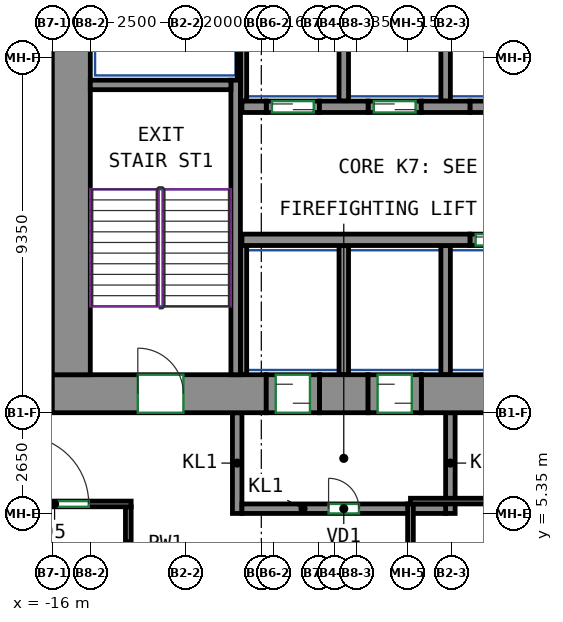
"""IFC4 building model, lengths in metres.
Left out: names, types, materials, properties, quantities, classifications, styles, units other than length and angle.
Written with IfcOpenShell. Run it as: python <this file> out.ifc"""

import sys

from ifc_helpers import new_model, si_unit, direction, frame, frame_2d, origin, place, context, subcontext, project, spatial, rectangle, extrude, source, transform, mapped, element, fill, save


model = new_model("IFC4")
c1 = context("Model", 3, precision=1e-05, world=origin(), true_north=direction((0.0, 1.0)))
c2 = subcontext(c1, "Body", "Model", "MODEL_VIEW")
j1 = project(units=[si_unit("LENGTHUNIT", "METRE"), si_unit("PLANEANGLEUNIT", "RADIAN")], contexts=[c1])
p1 = place(None, origin())
s1 = spatial("IfcSite", under=j1, at=p1, CompositionType="ELEMENT")
p2 = place(p1, origin())
s2 = spatial("IfcBuilding", under=s1, at=p2, CompositionType="ELEMENT")
p3 = place(p2, frame((0.0, 0.0, 31.0)))
s3 = spatial("IfcBuildingStorey", under=s2, at=p3, CompositionType="ELEMENT", Elevation=31.0)
m1 = source(origin(), c2, "Body", "SweptSolid", [
    extrude(rectangle(XDim=5.63, YDim=1.0, at=frame_2d((2.815, 0.0))), origin(), (0.0, 0.0, 1.0), 3.72),
])
p4 = place(p3, frame((-16.0, 8.5, 0.0), z_axis=(0.0, 0.0, 1.0), x_axis=(1.0, 0.0, 0.0)))
e1 = element("IfcWall", 1, at=p4, inside=s3, PredefinedType="SHEAR", context=c2, shape_type="MappedRepresentation", body=[
    mapped(m1, transform((0.0, 0.0, 0.0))),
])
p5 = place(p4, frame((2.25, 0.0, 0.0)))
e2 = element("IfcOpeningElement", 2, at=p5, cuts=e1, PredefinedType="OPENING", context=c2, shape_type="SweptSolid", body=[
    extrude(rectangle(XDim=1.2, YDim=2.1, at=frame_2d((0.6, 1.05))), frame((0.0, 0.51, 0.0), z_axis=(0.0, -1.0, 0.0), x_axis=(1.0, 0.0, 0.0)), (0.0, 0.0, 1.0), 1.02),
])
m2 = source(origin(), c2, "Body", "SweptSolid", [
    extrude(rectangle(XDim=1.28, YDim=1.0, at=frame_2d((0.64, 0.0))), origin(), (0.0, 0.0, 1.0), 3.72),
])
p6 = place(p3, frame((-8.97, 8.5, 0.0), z_axis=(0.0, 0.0, 1.0), x_axis=(1.0, 0.0, 0.0)))
e3 = element("IfcWall", 3, at=p6, inside=s3, PredefinedType="SHEAR", context=c2, shape_type="MappedRepresentation", body=[
    mapped(m2, transform((0.0, 0.0, 0.0))),
])
m3 = source(origin(), c2, "Body", "SweptSolid", [
    extrude(rectangle(XDim=14.18, YDim=1.0, at=frame_2d((7.09, 0.0))), origin(), (0.0, 0.0, 1.0), 3.72),
])
p7 = place(p3, frame((-6.29, 8.5, 0.0), z_axis=(0.0, 0.0, 1.0), x_axis=(1.0, 0.0, 0.0)))
e4 = element("IfcWall", 4, at=p7, inside=s3, PredefinedType="SHEAR", context=c2, shape_type="MappedRepresentation", body=[
    mapped(m3, transform((0.0, 0.0, 0.0))),
])
m4 = source(origin(), c2, "Body", "SweptSolid", [
    extrude(rectangle(XDim=12.0, YDim=1.0, at=frame_2d((6.0, 0.0))), origin(), (0.0, 0.0, 1.0), 3.72),
])
p8 = place(p3, frame((-15.5, 9.0, 0.0), z_axis=(0.0, 0.0, 1.0), x_axis=(0.0, 1.0, 0.0)))
e5 = element("IfcWall", 5, at=p8, inside=s3, PredefinedType="SHEAR", context=c2, shape_type="MappedRepresentation", body=[
    mapped(m4, transform((0.0, 0.0, 0.0))),
])
m5 = source(origin(), c2, "Body", "SweptSolid", [
    extrude(rectangle(XDim=7.75, YDim=0.25, at=frame_2d((3.875, 0.0))), origin(), (0.0, 0.0, 1.0), 3.72),
])
p9 = place(p3, frame((-11.175, 9.0, 0.0), z_axis=(0.0, 0.0, 1.0), x_axis=(0.0, 1.0, 0.0)))
e6 = element("IfcWall", 6, at=p9, inside=s3, PredefinedType="SHEAR", context=c2, shape_type="MappedRepresentation", body=[
    mapped(m5, transform((0.0, 0.0, 0.0))),
])
m6 = source(origin(), c2, "Body", "SweptSolid", [
    extrude(rectangle(XDim=3.7, YDim=0.25, at=frame_2d((1.85, 0.0))), origin(), (0.0, 0.0, 1.0), 3.72),
])
p10 = place(p3, frame((-15.0, 16.625, 0.0), z_axis=(0.0, 0.0, 1.0), x_axis=(1.0, 0.0, 0.0)))
e7 = element("IfcWall", 7, at=p10, inside=s3, PredefinedType="SHEAR", context=c2, shape_type="MappedRepresentation", body=[
    mapped(m6, transform((0.0, 0.0, 0.0))),
])
m7 = source(origin(), c2, "Body", "SweptSolid", [
    extrude(rectangle(XDim=6.0, YDim=0.3, at=frame_2d((3.0, 0.0))), origin(), (0.0, 0.0, 1.0), 3.72),
])
p11 = place(p3, frame((-11.01, 12.55, 0.0), z_axis=(0.0, 0.0, 1.0), x_axis=(1.0, 0.0, 0.0)))
e8 = element("IfcWall", 8, at=p11, inside=s3, PredefinedType="SHEAR", context=c2, shape_type="MappedRepresentation", body=[
    mapped(m7, transform((0.0, 0.0, 0.0))),
])
m8 = source(origin(), c2, "Body", "SweptSolid", [
    extrude(rectangle(XDim=0.64, YDim=0.3, at=frame_2d((0.32, 0.0))), origin(), (0.0, 0.0, 1.0), 3.72),
])
p12 = place(p3, frame((-11.01, 16.05, 0.0), z_axis=(0.0, 0.0, 1.0), x_axis=(1.0, 0.0, 0.0)))
e9 = element("IfcWall", 9, at=p12, inside=s3, PredefinedType="SHEAR", context=c2, shape_type="MappedRepresentation", body=[
    mapped(m8, transform((0.0, 0.0, 0.0))),
])
m9 = source(origin(), c2, "Body", "SweptSolid", [
    extrude(rectangle(XDim=1.28, YDim=0.3, at=frame_2d((0.64, 0.0))), origin(), (0.0, 0.0, 1.0), 3.72),
])
for number, where, z_axis, x_axis in (
    (10, (-8.97, 16.05, 0.0), (0.0, 0.0, 1.0), (1.0, 0.0, 0.0)),
    (11, (-6.29, 16.05, 0.0), (0.0, 0.0, 1.0), (1.0, 0.0, 0.0)),
):
    element("IfcWall", number, at=place(p3, frame(where, z_axis=z_axis, x_axis=x_axis)), inside=s3, PredefinedType="SHEAR", context=c2, shape_type="MappedRepresentation", body=[
        mapped(m9, transform((0.0, 0.0, 0.0))),
    ])
m10 = source(origin(), c2, "Body", "SweptSolid", [
    extrude(rectangle(XDim=1.4, YDim=0.3, at=frame_2d((0.7, 0.0))), origin(), (0.0, 0.0, 1.0), 3.72),
])
p13 = place(p3, frame((-5.01, 12.55, 0.0), z_axis=(0.0, 0.0, 1.0), x_axis=(1.0, 0.0, 0.0)))
e12 = element("IfcWall", 12, at=p13, inside=s3, PredefinedType="PARTITIONING", context=c2, shape_type="MappedRepresentation", body=[
    mapped(m10, transform((0.0, 0.0, 0.0))),
])
p14 = place(p13, frame((0.15, 0.0, 0.0)))
e13 = element("IfcOpeningElement", 13, at=p14, cuts=e12, PredefinedType="OPENING", context=c2, shape_type="SweptSolid", body=[
    extrude(rectangle(XDim=1.1, YDim=2.1, at=frame_2d((0.55, 1.05))), frame((0.0, 0.16, 0.0), z_axis=(0.0, -1.0, 0.0), x_axis=(1.0, 0.0, 0.0)), (0.0, 0.0, 1.0), 0.32),
])
m11 = source(origin(), c2, "Body", "SweptSolid", [
    extrude(rectangle(XDim=1.4, YDim=0.3, at=frame_2d((0.7, 0.0))), origin(), (0.0, 0.0, 1.0), 3.72),
])
p15 = place(p3, frame((-10.37, 16.05, 0.0), z_axis=(0.0, 0.0, 1.0), x_axis=(1.0, 0.0, 0.0)))
e14 = element("IfcWall", 14, at=p15, inside=s3, PredefinedType="PARTITIONING", context=c2, shape_type="MappedRepresentation", body=[
    mapped(m11, transform((0.0, 0.0, 0.0))),
])
p16 = place(p15, frame((0.15, 0.0, 0.0)))
e15 = element("IfcOpeningElement", 15, at=p16, cuts=e14, PredefinedType="OPENING", context=c2, shape_type="SweptSolid", body=[
    extrude(rectangle(XDim=1.1, YDim=2.1, at=frame_2d((0.55, 1.05))), frame((0.0, 0.16, 0.0), z_axis=(0.0, -1.0, 0.0), x_axis=(1.0, 0.0, 0.0)), (0.0, 0.0, 1.0), 0.32),
])
p17 = place(p3, frame((-7.69, 16.05, 0.0), z_axis=(0.0, 0.0, 1.0), x_axis=(1.0, 0.0, 0.0)))
e16 = element("IfcWall", 16, at=p17, inside=s3, PredefinedType="PARTITIONING", context=c2, shape_type="MappedRepresentation", body=[
    mapped(m10, transform((0.0, 0.0, 0.0))),
])
p18 = place(p17, frame((0.15, 0.0, 0.0)))
e17 = element("IfcOpeningElement", 17, at=p18, cuts=e16, PredefinedType="OPENING", context=c2, shape_type="SweptSolid", body=[
    extrude(rectangle(XDim=1.1, YDim=2.1, at=frame_2d((0.55, 1.05))), frame((0.0, 0.16, 0.0), z_axis=(0.0, -1.0, 0.0), x_axis=(1.0, 0.0, 0.0)), (0.0, 0.0, 1.0), 0.32),
])
p19 = place(p3, frame((-5.01, 16.05, 0.0), z_axis=(0.0, 0.0, 1.0), x_axis=(1.0, 0.0, 0.0)))
e18 = element("IfcWall", 18, at=p19, inside=s3, PredefinedType="PARTITIONING", context=c2, shape_type="MappedRepresentation", body=[
    mapped(m10, transform((0.0, 0.0, 0.0))),
])
m12 = source(origin(), c2, "Body", "SweptSolid", [
    extrude(rectangle(XDim=2.65, YDim=0.25, at=frame_2d((1.325, 0.0))), origin(), (0.0, 0.0, 1.0), 3.72),
])
for number, where, z_axis, x_axis in (
    (19, (-11.135, 5.35, 0.0), (0.0, 0.0, 1.0), (0.0, 1.0, 0.0)),
    (20, (-5.525, 5.35, 0.0), (0.0, 0.0, 1.0), (0.0, 1.0, 0.0)),
):
    element("IfcWall", number, at=place(p3, frame(where, z_axis=z_axis, x_axis=x_axis)), inside=s3, PredefinedType="PARTITIONING", context=c2, shape_type="MappedRepresentation", body=[
        mapped(m12, transform((0.0, 0.0, 0.0))),
    ])
m13 = source(origin(), c2, "Body", "SweptSolid", [
    extrude(rectangle(XDim=5.36, YDim=0.25, at=frame_2d((2.68, 0.0))), origin(), (0.0, 0.0, 1.0), 3.72),
])
p20 = place(p3, frame((-11.01, 5.475, 0.0), z_axis=(0.0, 0.0, 1.0), x_axis=(1.0, 0.0, 0.0)))
e21 = element("IfcWall", 21, at=p20, inside=s3, PredefinedType="PARTITIONING", context=c2, shape_type="MappedRepresentation", body=[
    mapped(m13, transform((0.0, 0.0, 0.0))),
])
p21 = place(p20, frame((2.28, 0.0, 0.0)))
e22 = element("IfcOpeningElement", 22, at=p21, cuts=e21, PredefinedType="OPENING", context=c2, shape_type="SweptSolid", body=[
    extrude(rectangle(XDim=0.8, YDim=2.0, at=frame_2d((0.4, 1.0))), frame((0.0, 0.135, 0.0), z_axis=(0.0, -1.0, 0.0), x_axis=(1.0, 0.0, 0.0)), (0.0, 0.0, 1.0), 0.27),
])
m14 = source(origin(), c2, "Body", "SweptSolid", [
    extrude(rectangle(XDim=3.275, YDim=0.165, at=frame_2d((1.638, 0.0))), origin(), (0.0, 0.0, 1.0), 3.72),
])
p22 = place(p3, frame((-10.968, 16.2, 0.0), z_axis=(0.0, 0.0, 1.0), x_axis=(0.0, 1.0, 0.0)))
e23 = element("IfcWall", 23, at=p22, inside=s3, PredefinedType="PARTITIONING", context=c2, shape_type="MappedRepresentation", body=[
    mapped(m14, transform((0.0, 0.0, 0.0))),
])
m15 = source(origin(), c2, "Body", "SweptSolid", [
    extrude(rectangle(XDim=2.725, YDim=0.085, at=frame_2d((1.363, 0.0))), origin(), (0.0, 0.0, 1.0), 3.72),
])
p23 = place(p3, frame((-11.093, 16.75, 0.0), z_axis=(0.0, 0.0, 1.0), x_axis=(0.0, 1.0, 0.0)))
e24 = element("IfcWall", 24, at=p23, inside=s3, PredefinedType="PARTITIONING", context=c2, shape_type="MappedRepresentation", body=[
    mapped(m15, transform((0.0, 0.0, 0.0))),
])
m16 = source(origin(), c2, "Body", "SweptSolid", [
    extrude(rectangle(XDim=3.275, YDim=0.25, at=frame_2d((1.638, 0.0))), origin(), (0.0, 0.0, 1.0), 3.72),
])
for number, where, z_axis, x_axis in (
    (25, (-5.65, 16.2, 0.0), (0.0, 0.0, 1.0), (0.0, 1.0, 0.0)),
    (26, (-8.33, 16.2, 0.0), (0.0, 0.0, 1.0), (0.0, 1.0, 0.0)),
):
    element("IfcWall", number, at=place(p3, frame(where, z_axis=z_axis, x_axis=x_axis)), inside=s3, PredefinedType="PARTITIONING", context=c2, shape_type="MappedRepresentation", body=[
        mapped(m16, transform((0.0, 0.0, 0.0))),
    ])
m17 = source(origin(), c2, "Body", "SweptSolid", [
    extrude(rectangle(XDim=3.4, YDim=0.165, at=frame_2d((1.7, 0.0))), origin(), (0.0, 0.0, 1.0), 3.72),
])
p24 = place(p3, frame((-10.968, 9.0, 0.0), z_axis=(0.0, 0.0, 1.0), x_axis=(0.0, 1.0, 0.0)))
e27 = element("IfcWall", 27, at=p24, inside=s3, PredefinedType="PARTITIONING", context=c2, shape_type="MappedRepresentation", body=[
    mapped(m17, transform((0.0, 0.0, 0.0))),
])
m18 = source(origin(), c2, "Body", "SweptSolid", [
    extrude(rectangle(XDim=3.4, YDim=0.25, at=frame_2d((1.7, 0.0))), origin(), (0.0, 0.0, 1.0), 3.72),
])
for number, where, z_axis, x_axis in (
    (28, (-5.65, 9.0, 0.0), (0.0, 0.0, 1.0), (0.0, 1.0, 0.0)),
    (29, (-8.33, 9.0, 0.0), (0.0, 0.0, 1.0), (0.0, 1.0, 0.0)),
):
    element("IfcWall", number, at=place(p3, frame(where, z_axis=z_axis, x_axis=x_axis)), inside=s3, PredefinedType="PARTITIONING", context=c2, shape_type="MappedRepresentation", body=[
        mapped(m18, transform((0.0, 0.0, 0.0))),
    ])
m19 = source(origin(), c2, "Body", "SweptSolid", [
    extrude(rectangle(XDim=1.4, YDim=1.0, at=frame_2d((0.7, 0.0))), origin(), (0.0, 0.0, 1.0), 2.7),
])
p25 = place(p3, frame((-10.37, 8.5, 0.0), z_axis=(0.0, 0.0, 1.0), x_axis=(1.0, 0.0, 0.0)))
e30 = element("IfcWall", 30, at=p25, inside=s3, PredefinedType="PARTITIONING", context=c2, shape_type="MappedRepresentation", body=[
    mapped(m19, transform((0.0, 0.0, 0.0))),
])
p26 = place(p25, frame((0.25, 0.0, 0.0)))
e31 = element("IfcOpeningElement", 31, at=p26, cuts=e30, PredefinedType="OPENING", context=c2, shape_type="SweptSolid", body=[
    extrude(rectangle(XDim=0.9, YDim=2.1, at=frame_2d((0.45, 1.05))), frame((0.0, 0.51, 0.0), z_axis=(0.0, -1.0, 0.0), x_axis=(1.0, 0.0, 0.0)), (0.0, 0.0, 1.0), 1.02),
])
m20 = source(origin(), c2, "Body", "SweptSolid", [
    extrude(rectangle(XDim=1.4, YDim=1.0, at=frame_2d((0.7, 0.0))), origin(), (0.0, 0.0, 1.0), 2.7),
])
p27 = place(p3, frame((-7.69, 8.5, 0.0), z_axis=(0.0, 0.0, 1.0), x_axis=(1.0, 0.0, 0.0)))
e32 = element("IfcWall", 32, at=p27, inside=s3, PredefinedType="PARTITIONING", context=c2, shape_type="MappedRepresentation", body=[
    mapped(m20, transform((0.0, 0.0, 0.0))),
])
p28 = place(p27, frame((0.25, 0.0, 0.0)))
e33 = element("IfcOpeningElement", 33, at=p28, cuts=e32, PredefinedType="OPENING", context=c2, shape_type="SweptSolid", body=[
    extrude(rectangle(XDim=0.9, YDim=2.1, at=frame_2d((0.45, 1.05))), frame((0.0, 0.51, 0.0), z_axis=(0.0, -1.0, 0.0), x_axis=(1.0, 0.0, 0.0)), (0.0, 0.0, 1.0), 1.02),
])
p29 = place(p3, frame((-14.0, 5.525, 0.0), z_axis=(0.0, 0.0, 1.0), x_axis=(0.0, -1.0, 0.0)))
e34 = element("IfcWall", 34, at=p29, inside=s3, PredefinedType="PARTITIONING", context=c2, shape_type="SweptSolid", body=[
    extrude(rectangle(XDim=1.95, YDim=0.15, at=frame_2d((0.975, 0.0))), origin(), (0.0, 0.0, 1.0), 3.72),
])
p30 = place(p3, frame((-19.275, 5.6, 0.0), z_axis=(0.0, 0.0, 1.0), x_axis=(1.0, 0.0, 0.0)))
e35 = element("IfcWall", 35, at=p30, inside=s3, PredefinedType="PARTITIONING", context=c2, shape_type="SweptSolid", body=[
    extrude(rectangle(XDim=5.35, YDim=0.15, at=frame_2d((2.675, 0.0))), origin(), (0.0, 0.0, 1.0), 3.72),
])
p31 = place(p30, frame((2.435, 0.0, 0.0)))
e36 = element("IfcOpeningElement", 36, at=p31, cuts=e35, PredefinedType="OPENING", context=c2, shape_type="SweptSolid", body=[
    extrude(rectangle(XDim=1.8, YDim=2.1, at=frame_2d((0.9, 1.05))), frame((0.0, 0.085, 0.0), z_axis=(0.0, -1.0, 0.0), x_axis=(1.0, 0.0, 0.0)), (0.0, 0.0, 1.0), 0.17),
])
p32 = place(p3, frame((-6.575, -9.4, 0.0), z_axis=(0.0, 0.0, 1.0), x_axis=(0.0, 1.0, 0.0)))
e37 = element("IfcWall", 37, at=p32, inside=s3, PredefinedType="PARTITIONING", context=c2, shape_type="SweptSolid", body=[
    extrude(rectangle(XDim=15.0, YDim=0.15, at=frame_2d((7.5, 0.0))), origin(), (0.0, 0.0, 1.0), 3.72),
])
p33 = place(p3, frame((-6.575, 5.675, 0.0), z_axis=(0.0, 0.0, 1.0), x_axis=(1.0, 0.0, 0.0)))
e38 = element("IfcWall", 38, at=p33, inside=s3, PredefinedType="PARTITIONING", context=c2, shape_type="SweptSolid", body=[
    extrude(rectangle(XDim=15.075, YDim=0.15, at=frame_2d((7.538, 0.0))), origin(), (0.0, 0.0, 1.0), 3.72),
])
p34 = place(p21, origin())
e39 = element("IfcDoor", 39, at=p34, inside=s3, OperationType="SINGLE_SWING_LEFT", PredefinedType="DOOR", context=c2, shape_type="SweptSolid", body=[
    extrude(rectangle(XDim=0.8, YDim=2.0, at=frame_2d((0.4, 1.0))), frame((0.0, 0.025, 0.0), z_axis=(0.0, -1.0, 0.0), x_axis=(1.0, 0.0, 0.0)), (0.0, 0.0, 1.0), 0.05),
])
fill(e22, e39)
p35 = place(p26, origin())
e40 = element("IfcDoor", 40, at=p35, inside=s3, OperationType="SLIDING_TO_LEFT", PredefinedType="DOOR", context=c2, shape_type="SweptSolid", body=[
    extrude(rectangle(XDim=0.9, YDim=2.1, at=frame_2d((0.45, 1.05))), frame((0.0, 0.405, 0.0), z_axis=(0.0, -1.0, 0.0), x_axis=(1.0, 0.0, 0.0)), (0.0, 0.0, 1.0), 0.05),
])
fill(e31, e40)
p36 = place(p28, origin())
e41 = element("IfcDoor", 41, at=p36, inside=s3, OperationType="SLIDING_TO_RIGHT", PredefinedType="DOOR", context=c2, shape_type="SweptSolid", body=[
    extrude(rectangle(XDim=0.9, YDim=2.1, at=frame_2d((0.45, 1.05))), frame((0.0, 0.405, 0.0), z_axis=(0.0, -1.0, 0.0), x_axis=(1.0, 0.0, 0.0)), (0.0, 0.0, 1.0), 0.05),
])
fill(e33, e41)
p37 = place(p14, origin())
e42 = element("IfcDoor", 42, at=p37, inside=s3, OperationType="DOUBLE_DOOR_SLIDING", PredefinedType="DOOR", context=c2, shape_type="SweptSolid", body=[
    extrude(rectangle(XDim=1.1, YDim=2.1, at=frame_2d((0.55, 1.05))), frame((0.0, 0.025, 0.0), z_axis=(0.0, -1.0, 0.0), x_axis=(1.0, 0.0, 0.0)), (0.0, 0.0, 1.0), 0.05),
])
fill(e13, e42)
p38 = place(p16, origin())
e43 = element("IfcDoor", 43, at=p38, inside=s3, OperationType="DOUBLE_DOOR_SLIDING", PredefinedType="DOOR", context=c2, shape_type="SweptSolid", body=[
    extrude(rectangle(XDim=1.1, YDim=2.1, at=frame_2d((0.55, 1.05))), frame((0.0, 0.025, 0.0), z_axis=(0.0, -1.0, 0.0), x_axis=(1.0, 0.0, 0.0)), (0.0, 0.0, 1.0), 0.05),
])
fill(e15, e43)
p39 = place(p18, origin())
e44 = element("IfcDoor", 44, at=p39, inside=s3, OperationType="DOUBLE_DOOR_SLIDING", PredefinedType="DOOR", context=c2, shape_type="SweptSolid", body=[
    extrude(rectangle(XDim=1.1, YDim=2.1, at=frame_2d((0.55, 1.05))), frame((0.0, 0.025, 0.0), z_axis=(0.0, -1.0, 0.0), x_axis=(1.0, 0.0, 0.0)), (0.0, 0.0, 1.0), 0.05),
])
fill(e17, e44)
p40 = place(p5, origin())
e45 = element("IfcDoor", 45, at=p40, inside=s3, OperationType="DOUBLE_DOOR_SINGLE_SWING", PredefinedType="DOOR", context=c2, shape_type="SweptSolid", body=[
    extrude(rectangle(XDim=1.2, YDim=2.1, at=frame_2d((0.6, 1.05))), frame((0.0, 0.405, 0.0), z_axis=(0.0, -1.0, 0.0), x_axis=(1.0, 0.0, 0.0)), (0.0, 0.0, 1.0), 0.05),
])
fill(e2, e45)
p41 = place(p31, origin())
e46 = element("IfcDoor", 46, at=p41, inside=s3, OperationType="DOUBLE_DOOR_SINGLE_SWING", PredefinedType="DOOR", context=c2, shape_type="SweptSolid", body=[
    extrude(rectangle(XDim=1.8, YDim=2.1, at=frame_2d((0.9, 1.05))), frame((0.0, 0.025, 0.0), z_axis=(0.0, -1.0, 0.0), x_axis=(1.0, 0.0, 0.0)), (0.0, 0.0, 1.0), 0.05),
])
fill(e36, e46)
save(model, sys.argv[1])
